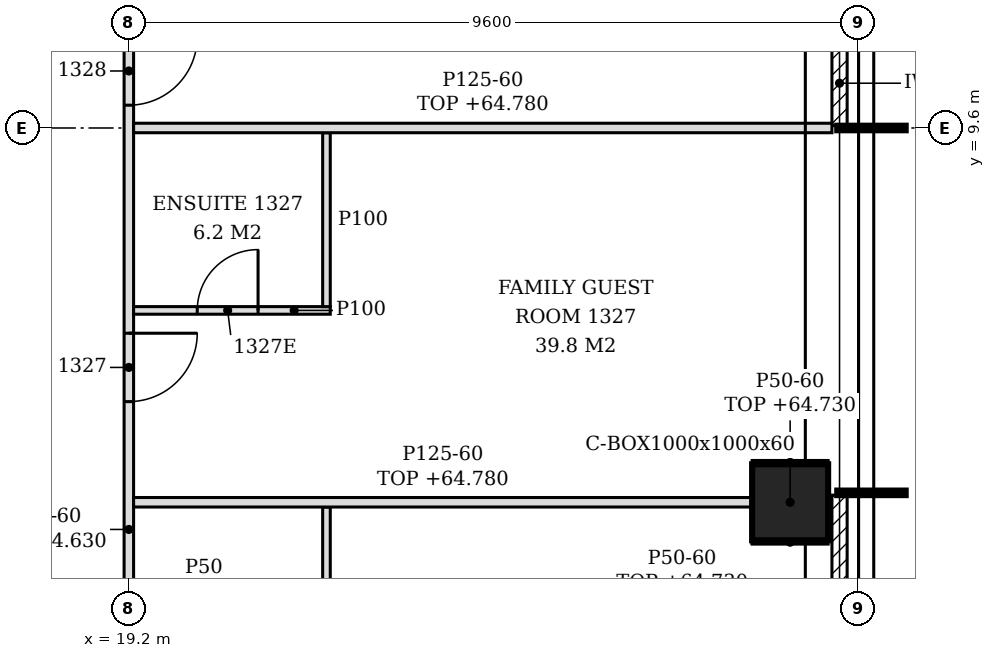
"""IFC4 building model, lengths in metres.
Left out: names, types, materials, properties, quantities, classifications, styles, units other than length and angle.
Written with IfcOpenShell. Run it as: python <this file> out.ifc"""

import sys

from ifc_helpers import new_model, si_unit, direction, frame, frame_2d, origin, origin_2d, place, context, subcontext, project, spatial, polyline, rectangle, hollow_rectangle, outline, extrude, element, fill, save


model = new_model("IFC4")
c1 = context("Model", 3, precision=1e-05, world=origin(), true_north=direction((0.0, 1.0)))
c2 = subcontext(c1, "Body", "Model", "MODEL_VIEW")
j1 = project(units=[si_unit("LENGTHUNIT", "METRE"), si_unit("PLANEANGLEUNIT", "RADIAN")], contexts=[c1])
p1 = place(None, origin())
s1 = spatial("IfcSite", under=j1, at=p1, CompositionType="ELEMENT")
p2 = place(p1, origin())
s2 = spatial("IfcBuilding", under=s1, at=p2, CompositionType="ELEMENT")
p3 = place(p2, frame((0.0, 0.0, 61.8)))
s3 = spatial("IfcBuildingStorey", under=s2, at=p3, CompositionType="ELEMENT", Elevation=61.8)
p4 = place(p3, frame((27.9, 4.676, -0.15), z_axis=(0.0, 0.0, 1.0), x_axis=(1.0, 0.0, 0.0)))
e1 = element("IfcColumn", 1, at=p4, inside=s3, PredefinedType="COLUMN", context=c2, shape_type="SweptSolid", body=[
    extrude(hollow_rectangle(XDim=1.0, YDim=1.0, WallThickness=0.06, at=origin_2d()), origin(), (0.0, 0.0, 1.0), 3.6),
])
p5 = place(p3, frame((28.55, 0.03, 0.0), z_axis=(0.0, 0.0, 1.0), x_axis=(0.0, 1.0, 0.0)))
e2 = element("IfcWall", 2, at=p5, inside=s3, PredefinedType="NOTDEFINED", context=c2, shape_type="SweptSolid", body=[
    extrude(rectangle(XDim=4.74, YDim=0.2, at=frame_2d((2.37, 0.0))), origin(), (0.0, 0.0, 1.0), 3.45),
])
p6 = place(p5, frame((1.17, 0.0, 0.0)))
e3 = element("IfcOpeningElement", 3, at=p6, cuts=e2, PredefinedType="OPENING", context=c2, shape_type="SweptSolid", body=[
    extrude(rectangle(XDim=2.4, YDim=2.4, at=frame_2d((1.2, 1.2))), frame((0.0, 0.11, 0.0), z_axis=(0.0, -1.0, 0.0), x_axis=(1.0, 0.0, 0.0)), (0.0, 0.0, 1.0), 0.22),
])
p7 = place(p3, frame((28.55, 9.63, 0.0), z_axis=(0.0, 0.0, 1.0), x_axis=(0.0, 1.0, 0.0)))
e4 = element("IfcWall", 4, at=p7, inside=s3, PredefinedType="NOTDEFINED", context=c2, shape_type="SweptSolid", body=[
    extrude(rectangle(XDim=4.626, YDim=0.2, at=frame_2d((2.313, 0.0))), origin(), (0.0, 0.0, 1.0), 3.45),
])
p8 = place(p7, frame((1.118, 0.0, 0.0)))
e5 = element("IfcOpeningElement", 5, at=p8, cuts=e4, PredefinedType="OPENING", context=c2, shape_type="SweptSolid", body=[
    extrude(rectangle(XDim=2.4, YDim=2.4, at=frame_2d((1.2, 1.2))), frame((0.0, 0.11, 0.0), z_axis=(0.0, -1.0, 0.0), x_axis=(1.0, 0.0, 0.0)), (0.0, 0.0, 1.0), 0.22),
])
p9 = place(p3, frame((21.8, 2.326, 0.0), z_axis=(0.0, 0.0, 1.0), x_axis=(0.0, 1.0, 0.0)))
e6 = element("IfcWall", 6, at=p9, inside=s3, PredefinedType="PARTITIONING", context=c2, shape_type="SweptSolid", body=[
    extrude(rectangle(XDim=2.288, YDim=0.1, at=frame_2d((1.144, 0.0))), origin(), (0.0, 0.0, 1.0), 3.45),
])
p10 = place(p3, frame((19.2, 2.637, 0.0), z_axis=(0.0, 0.0, 1.0), x_axis=(0.0, 1.0, 0.0)))
e7 = element("IfcWall", 7, at=p10, inside=s3, PredefinedType="PARTITIONING", context=c2, shape_type="SweptSolid", body=[
    extrude(rectangle(XDim=10.326, YDim=0.125, at=frame_2d((5.163, 0.0))), origin(), (0.0, 0.0, 1.0), 2.83),
])
p11 = place(p10, frame((3.363, 0.0, 0.0)))
e8 = element("IfcOpeningElement", 8, at=p11, cuts=e7, PredefinedType="OPENING", context=c2, shape_type="SweptSolid", body=[
    extrude(rectangle(XDim=0.9, YDim=2.1, at=frame_2d((0.45, 1.05))), frame((0.0, 0.073, 0.0), z_axis=(0.0, -1.0, 0.0), x_axis=(1.0, 0.0, 0.0)), (0.0, 0.0, 1.0), 0.145),
])
p12 = place(p10, frame((7.263, 0.0, 0.0)))
e9 = element("IfcOpeningElement", 9, at=p12, cuts=e7, PredefinedType="OPENING", context=c2, shape_type="SweptSolid", body=[
    extrude(rectangle(XDim=0.9, YDim=2.1, at=frame_2d((0.45, 1.05))), frame((0.0, 0.073, 0.0), z_axis=(0.0, -1.0, 0.0), x_axis=(1.0, 0.0, 0.0)), (0.0, 0.0, 1.0), 0.145),
])
p13 = place(p3, frame((19.262, 4.676, 0.0), z_axis=(0.0, 0.0, 1.0), x_axis=(1.0, 0.0, 0.0)))
e10 = element("IfcWall", 10, at=p13, inside=s3, PredefinedType="PARTITIONING", context=c2, shape_type="SweptSolid", body=[
    extrude(outline(polyline([(0.0, 0.0), (8.137, 0.0), (8.137, 2.98), (0.087, 2.98), (0.085, 2.83), (0.0, 2.83), (0.0, 0.0)])), frame((0.0, 0.062, 0.0), z_axis=(0.0, -1.0, 0.0), x_axis=(1.0, 0.0, 0.0)), (0.0, 0.0, 1.0), 0.125),
])
p14 = place(p3, frame((19.262, 7.2, 0.0), z_axis=(0.0, 0.0, 1.0), x_axis=(1.0, 0.0, 0.0)))
e11 = element("IfcWall", 11, at=p14, inside=s3, PredefinedType="PARTITIONING", context=c2, shape_type="SweptSolid", body=[
    extrude(outline(polyline([(0.0, 0.0), (2.588, 0.0), (2.587, 3.45), (0.087, 3.45), (0.085, 2.83), (0.0, 2.83), (0.0, 0.0)])), frame((0.0, 0.05, 0.0), z_axis=(0.0, -1.0, 0.0), x_axis=(1.0, 0.0, 0.0)), (0.0, 0.0, 1.0), 0.1),
])
p15 = place(p14, frame((0.837, 0.0, 0.0)))
e12 = element("IfcOpeningElement", 12, at=p15, cuts=e11, PredefinedType="OPENING", context=c2, shape_type="SweptSolid", body=[
    extrude(rectangle(XDim=0.8, YDim=2.1, at=frame_2d((0.4, 1.05))), frame((0.0, 0.06, 0.0), z_axis=(0.0, -1.0, 0.0), x_axis=(1.0, 0.0, 0.0)), (0.0, 0.0, 1.0), 0.12),
])
p16 = place(p3, frame((21.8, 7.25, 0.0), z_axis=(0.0, 0.0, 1.0), x_axis=(0.0, 1.0, 0.0)))
e13 = element("IfcWall", 13, at=p16, inside=s3, PredefinedType="PARTITIONING", context=c2, shape_type="SweptSolid", body=[
    extrude(outline(polyline([(0.0, 0.0), (2.288, 0.0), (2.288, 2.98), (2.255, 2.98), (2.253, 3.45), (0.0, 3.45), (0.0, 0.0)])), frame((0.0, 0.05, 0.0), z_axis=(0.0, -1.0, 0.0), x_axis=(1.0, 0.0, 0.0)), (0.0, 0.0, 1.0), 0.1),
])
p17 = place(p3, frame((19.262, 9.6, 0.0), z_axis=(0.0, 0.0, 1.0), x_axis=(1.0, 0.0, 0.0)))
e14 = element("IfcWall", 14, at=p17, inside=s3, PredefinedType="PARTITIONING", context=c2, shape_type="SweptSolid", body=[
    extrude(outline(polyline([(0.0, 0.0), (9.188, 0.0), (9.188, 2.98), (8.788, 2.98), (8.785, 2.93), (8.488, 2.93), (8.486, 2.98), (0.087, 2.98), (0.085, 2.83), (0.0, 2.83), (0.0, 0.0)])), frame((0.0, 0.062, 0.0), z_axis=(0.0, -1.0, 0.0), x_axis=(1.0, 0.0, 0.0)), (0.0, 0.0, 1.0), 0.125),
])
for number, where, z_axis, x_axis in (
    (15, (27.4, 5.201, 0.0), (0.0, 0.0, 1.0), (1.0, 0.0, 0.0)),
    (16, (27.4, 4.151, 0.0), (0.0, 0.0, 1.0), (1.0, 0.0, 0.0)),
):
    element("IfcWall", number, at=place(p3, frame(where, z_axis=z_axis, x_axis=x_axis)), inside=s3, PredefinedType="PARTITIONING", context=c2, shape_type="SweptSolid", body=[
        extrude(rectangle(XDim=1.0, YDim=0.05, at=frame_2d((0.5, 0.0))), origin(), (0.0, 0.0, 1.0), 2.93),
    ])
p18 = place(p11, frame((0.9, 0.0, 0.0), z_axis=(0.0, 0.0, 1.0), x_axis=(-1.0, 0.0, 0.0)))
e17 = element("IfcDoor", 17, at=p18, inside=s3, OperationType="SINGLE_SWING_LEFT", PredefinedType="DOOR", context=c2, shape_type="SweptSolid", body=[
    extrude(rectangle(XDim=0.9, YDim=2.1, at=frame_2d((0.45, 1.05))), frame((0.0, 0.025, 0.0), z_axis=(0.0, -1.0, 0.0), x_axis=(1.0, 0.0, 0.0)), (0.0, 0.0, 1.0), 0.05),
])
fill(e8, e17)
p19 = place(p15, origin())
e18 = element("IfcDoor", 18, at=p19, inside=s3, OperationType="SINGLE_SWING_RIGHT", PredefinedType="DOOR", context=c2, shape_type="SweptSolid", body=[
    extrude(rectangle(XDim=0.8, YDim=2.1, at=frame_2d((0.4, 1.05))), frame((0.0, 0.025, 0.0), z_axis=(0.0, -1.0, 0.0), x_axis=(1.0, 0.0, 0.0)), (0.0, 0.0, 1.0), 0.05),
])
fill(e12, e18)
p20 = place(p12, frame((0.9, 0.0, 0.0), z_axis=(0.0, 0.0, 1.0), x_axis=(-1.0, 0.0, 0.0)))
e19 = element("IfcDoor", 19, at=p20, inside=s3, OperationType="SINGLE_SWING_LEFT", PredefinedType="DOOR", context=c2, shape_type="SweptSolid", body=[
    extrude(rectangle(XDim=0.9, YDim=2.1, at=frame_2d((0.45, 1.05))), frame((0.0, 0.025, 0.0), z_axis=(0.0, -1.0, 0.0), x_axis=(1.0, 0.0, 0.0)), (0.0, 0.0, 1.0), 0.05),
])
fill(e9, e19)
save(model, sys.argv[1])
